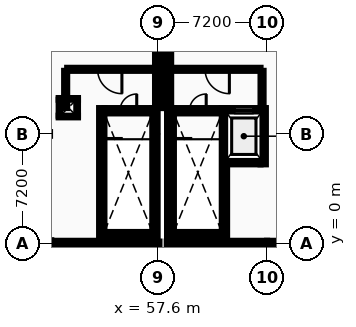
"""IFC4 building model, lengths in metres.
Left out: names, types, materials, properties, quantities, classifications, styles, units other than length and angle.
Written with IfcOpenShell. Run it as: python <this file> out.ifc"""

import sys

from ifc_helpers import new_model, si_unit, direction, frame, frame_2d, origin, origin_2d, place, context, subcontext, project, spatial, rectangle, i_section, extrude, element, fill, save


model = new_model("IFC4")
c1 = context("Model", 3, precision=1e-05, world=origin(), true_north=direction((0.0, 1.0)))
c2 = subcontext(c1, "Body", "Model", "MODEL_VIEW")
j1 = project(units=[si_unit("LENGTHUNIT", "METRE"), si_unit("PLANEANGLEUNIT", "RADIAN")], contexts=[c1])
p1 = place(None, origin())
s1 = spatial("IfcSite", under=j1, at=p1, CompositionType="ELEMENT")
p2 = place(p1, origin())
s2 = spatial("IfcBuilding", under=s1, at=p2, CompositionType="ELEMENT")
p3 = place(p2, frame((0.0, 0.0, 18.4)))
s3 = spatial("IfcBuildingStorey", under=s2, at=p3, CompositionType="ELEMENT", Elevation=18.4)
for number, where, z_axis, x_axis in (
    (1, (57.6, 0.0, 0.0), (0.0, 0.0, 1.0), (1.0, 0.0, 0.0)),
    (2, (58.32, 0.0, 0.0), (0.0, 0.0, 1.0), (1.0, 0.0, 0.0)),
    (3, (64.8, 0.0, 0.0), (0.0, 0.0, 1.0), (1.0, 0.0, 0.0)),
):
    element("IfcColumn", number, at=place(p3, frame(where, z_axis=z_axis, x_axis=x_axis)), inside=s3, PredefinedType="COLUMN", context=c2, shape_type="SweptSolid", body=[
        extrude(i_section(OverallWidth=0.24, OverallDepth=0.24, WebThickness=0.01, FlangeThickness=0.017, FilletRadius=0.021, at=origin_2d()), origin(), (0.0, 0.0, 1.0), 4.4),
    ])
p4 = place(p3, frame((50.29, 0.0, 0.0), z_axis=(0.0, 0.0, 1.0), x_axis=(1.0, 0.0, 0.0)))
e4 = element("IfcWall", 4, at=p4, inside=s3, PredefinedType="STANDARD", context=c2, shape_type="SweptSolid", body=[
    extrude(rectangle(XDim=7.14, YDim=0.34, at=frame_2d((3.57, 0.0))), origin(), (0.0, 0.0, 1.0), 4.035),
])
p5 = place(p4, frame((1.576, 0.0, 0.95)))
e5 = element("IfcOpeningElement", 5, at=p5, cuts=e4, PredefinedType="OPENING", context=c2, shape_type="SweptSolid", body=[
    extrude(rectangle(XDim=1.132, YDim=1.404, at=frame_2d((0.566, 0.702))), frame((0.0, 0.18, 0.0), z_axis=(0.0, -1.0, 0.0), x_axis=(1.0, 0.0, 0.0)), (0.0, 0.0, 1.0), 0.36),
])
p6 = place(p4, frame((4.432, 0.0, 0.95)))
e6 = element("IfcOpeningElement", 6, at=p6, cuts=e4, PredefinedType="OPENING", context=c2, shape_type="SweptSolid", body=[
    extrude(rectangle(XDim=1.132, YDim=1.404, at=frame_2d((0.566, 0.702))), frame((0.0, 0.18, 0.0), z_axis=(0.0, -1.0, 0.0), x_axis=(1.0, 0.0, 0.0)), (0.0, 0.0, 1.0), 0.36),
])
p7 = place(p3, frame((57.6, 8.9, 0.0), z_axis=(0.0, 0.0, 1.0), x_axis=(0.0, 1.0, 0.0)))
e7 = element("IfcWall", 7, at=p7, inside=s3, PredefinedType="STANDARD", context=c2, shape_type="SweptSolid", body=[
    extrude(rectangle(XDim=5.5, YDim=0.34, at=frame_2d((2.75, 0.0))), origin(), (0.0, 0.0, 1.0), 4.11),
])
p8 = place(p3, frame((58.49, 0.0, 0.0), z_axis=(0.0, 0.0, 1.0), x_axis=(1.0, 0.0, 0.0)))
e8 = element("IfcWall", 8, at=p8, inside=s3, PredefinedType="STANDARD", context=c2, shape_type="SweptSolid", body=[
    extrude(rectangle(XDim=6.31, YDim=0.34, at=frame_2d((3.155, 0.0))), origin(), (0.0, 0.0, 1.0), 4.035),
])
p9 = place(p3, frame((64.8, 0.0, 0.0), z_axis=(0.0, 0.0, 1.0), x_axis=(1.0, 0.0, 0.0)))
e9 = element("IfcWall", 9, at=p9, inside=s3, PredefinedType="STANDARD", context=c2, shape_type="SweptSolid", body=[
    extrude(rectangle(XDim=7.2, YDim=0.34, at=frame_2d((3.6, 0.0))), origin(), (0.0, 0.0, 1.0), 4.035),
])
p10 = place(p9, frame((1.645, 0.0, 0.95)))
e10 = element("IfcOpeningElement", 10, at=p10, cuts=e9, PredefinedType="OPENING", context=c2, shape_type="SweptSolid", body=[
    extrude(rectangle(XDim=1.03, YDim=1.368, at=frame_2d((0.515, 0.684))), frame((0.0, 0.18, 0.0), z_axis=(0.0, -1.0, 0.0), x_axis=(1.0, 0.0, 0.0)), (0.0, 0.0, 1.0), 0.36),
])
p11 = place(p9, frame((4.525, 0.0, 0.95)))
e11 = element("IfcOpeningElement", 11, at=p11, cuts=e9, PredefinedType="OPENING", context=c2, shape_type="SweptSolid", body=[
    extrude(rectangle(XDim=1.03, YDim=1.368, at=frame_2d((0.515, 0.684))), frame((0.0, 0.18, 0.0), z_axis=(0.0, -1.0, 0.0), x_axis=(1.0, 0.0, 0.0)), (0.0, 0.0, 1.0), 0.36),
])
p12 = place(p3, frame((58.32, 14.4, 0.0), z_axis=(0.0, 0.0, 1.0), x_axis=(0.0, -1.0, 0.0)))
e12 = element("IfcWall", 12, at=p12, inside=s3, PredefinedType="STANDARD", context=c2, shape_type="SweptSolid", body=[
    extrude(rectangle(XDim=5.5, YDim=0.34, at=frame_2d((2.75, 0.0))), origin(), (0.0, 0.0, 1.0), 4.11),
])
p13 = place(p3, frame((58.32, 0.2, 4.4), z_axis=(0.0, 0.0, 1.0), x_axis=(0.0, 1.0, 0.0)))
e13 = element("IfcWall", 13, at=p13, inside=s3, PredefinedType="PARAPET", context=c2, shape_type="SweptSolid", body=[
    extrude(rectangle(XDim=21.2, YDim=0.2, at=frame_2d((10.6, 0.0))), origin(), (0.0, 0.0, 1.0), 0.55),
])
p14 = place(p3, frame((54.1, 0.575, 0.0), z_axis=(0.0, 0.0, 1.0), x_axis=(1.0, 0.0, 0.0)))
e14 = element("IfcWall", 14, at=p14, inside=s3, PredefinedType="SHEAR", context=c2, shape_type="SweptSolid", body=[
    extrude(rectangle(XDim=3.15, YDim=0.35, at=frame_2d((1.575, 0.0))), origin(), (0.0, 0.0, 1.0), 4.18),
])
p15 = place(p3, frame((54.1, 8.725, 0.0), z_axis=(0.0, 0.0, 1.0), x_axis=(1.0, 0.0, 0.0)))
e15 = element("IfcWall", 15, at=p15, inside=s3, PredefinedType="SHEAR", context=c2, shape_type="SweptSolid", body=[
    extrude(rectangle(XDim=3.15, YDim=0.35, at=frame_2d((1.575, 0.0))), origin(), (0.0, 0.0, 1.0), 4.18),
])
p16 = place(p15, frame((1.025, 0.0, 0.0)))
e16 = element("IfcOpeningElement", 16, at=p16, cuts=e15, PredefinedType="OPENING", context=c2, shape_type="SweptSolid", body=[
    extrude(rectangle(XDim=1.1, YDim=2.15, at=frame_2d((0.55, 1.075))), frame((0.0, 0.185, 0.0), z_axis=(0.0, -1.0, 0.0), x_axis=(1.0, 0.0, 0.0)), (0.0, 0.0, 1.0), 0.37),
])
p17 = place(p3, frame((53.925, 0.4, 0.0), z_axis=(0.0, 0.0, 1.0), x_axis=(0.0, 1.0, 0.0)))
e17 = element("IfcWall", 17, at=p17, inside=s3, PredefinedType="SHEAR", context=c2, shape_type="SweptSolid", body=[
    extrude(rectangle(XDim=8.5, YDim=0.35, at=frame_2d((4.25, 0.0))), origin(), (0.0, 0.0, 1.0), 4.18),
])
p18 = place(p3, frame((57.425, 0.34, 0.0), z_axis=(0.0, 0.0, 1.0), x_axis=(0.0, 1.0, 0.0)))
e18 = element("IfcWall", 18, at=p18, inside=s3, PredefinedType="SHEAR", context=c2, shape_type="SweptSolid", body=[
    extrude(rectangle(XDim=8.56, YDim=0.35, at=frame_2d((4.28, 0.0))), origin(), (0.0, 0.0, 1.0), 4.18),
])
p19 = place(p3, frame((51.65, 11.45, 0.0), z_axis=(0.0, 0.0, 1.0), x_axis=(1.0, 0.0, 0.0)))
e19 = element("IfcWall", 19, at=p19, inside=s3, PredefinedType="PARTITIONING", context=c2, shape_type="SweptSolid", body=[
    extrude(rectangle(XDim=5.6, YDim=0.2, at=frame_2d((2.8, 0.0))), origin(), (0.0, 0.0, 1.0), 4.18),
])
p20 = place(p19, frame((2.0, 0.0, 0.0)))
e20 = element("IfcOpeningElement", 20, at=p20, cuts=e19, PredefinedType="OPENING", context=c2, shape_type="SweptSolid", body=[
    extrude(rectangle(XDim=1.6, YDim=2.2, at=frame_2d((0.8, 1.1))), frame((0.0, 0.11, 0.0), z_axis=(0.0, -1.0, 0.0), x_axis=(1.0, 0.0, 0.0)), (0.0, 0.0, 1.0), 0.22),
])
p21 = place(p3, frame((51.55, 8.9, 0.0), z_axis=(0.0, 0.0, 1.0), x_axis=(0.0, 1.0, 0.0)))
e21 = element("IfcWall", 21, at=p21, inside=s3, PredefinedType="PARTITIONING", context=c2, shape_type="SweptSolid", body=[
    extrude(rectangle(XDim=2.45, YDim=0.2, at=frame_2d((1.225, 0.0))), origin(), (0.0, 0.0, 1.0), 4.18),
])
p22 = place(p3, frame((58.67, 0.575, 0.0), z_axis=(0.0, 0.0, 1.0), x_axis=(1.0, 0.0, 0.0)))
e22 = element("IfcWall", 22, at=p22, inside=s3, PredefinedType="SHEAR", context=c2, shape_type="SweptSolid", body=[
    extrude(rectangle(XDim=3.15, YDim=0.35, at=frame_2d((1.575, 0.0))), origin(), (0.0, 0.0, 1.0), 4.18),
])
p23 = place(p3, frame((58.67, 8.725, 0.0), z_axis=(0.0, 0.0, 1.0), x_axis=(1.0, 0.0, 0.0)))
e23 = element("IfcWall", 23, at=p23, inside=s3, PredefinedType="SHEAR", context=c2, shape_type="SweptSolid", body=[
    extrude(rectangle(XDim=3.15, YDim=0.35, at=frame_2d((1.575, 0.0))), origin(), (0.0, 0.0, 1.0), 4.18),
])
p24 = place(p23, frame((1.025, 0.0, 0.0)))
e24 = element("IfcOpeningElement", 24, at=p24, cuts=e23, PredefinedType="OPENING", context=c2, shape_type="SweptSolid", body=[
    extrude(rectangle(XDim=1.1, YDim=2.15, at=frame_2d((0.55, 1.075))), frame((0.0, 0.185, 0.0), z_axis=(0.0, -1.0, 0.0), x_axis=(1.0, 0.0, 0.0)), (0.0, 0.0, 1.0), 0.37),
])
p25 = place(p3, frame((58.495, 0.34, 0.0), z_axis=(0.0, 0.0, 1.0), x_axis=(0.0, 1.0, 0.0)))
e25 = element("IfcWall", 25, at=p25, inside=s3, PredefinedType="SHEAR", context=c2, shape_type="SweptSolid", body=[
    extrude(rectangle(XDim=8.56, YDim=0.35, at=frame_2d((4.28, 0.0))), origin(), (0.0, 0.0, 1.0), 4.18),
])
p26 = place(p3, frame((61.995, 0.4, 0.0), z_axis=(0.0, 0.0, 1.0), x_axis=(0.0, 1.0, 0.0)))
e26 = element("IfcWall", 26, at=p26, inside=s3, PredefinedType="SHEAR", context=c2, shape_type="SweptSolid", body=[
    extrude(rectangle(XDim=8.5, YDim=0.35, at=frame_2d((4.25, 0.0))), origin(), (0.0, 0.0, 1.0), 4.18),
])
p27 = place(p3, frame((62.17, 5.375, 0.0), z_axis=(0.0, 0.0, 1.0), x_axis=(1.0, 0.0, 0.0)))
e27 = element("IfcWall", 27, at=p27, inside=s3, PredefinedType="SHEAR", context=c2, shape_type="SweptSolid", body=[
    extrude(rectangle(XDim=2.2, YDim=0.35, at=frame_2d((1.1, 0.0))), origin(), (0.0, 0.0, 1.0), 4.18),
])
p28 = place(p3, frame((62.17, 8.725, 0.0), z_axis=(0.0, 0.0, 1.0), x_axis=(1.0, 0.0, 0.0)))
e28 = element("IfcWall", 28, at=p28, inside=s3, PredefinedType="SHEAR", context=c2, shape_type="SweptSolid", body=[
    extrude(rectangle(XDim=2.2, YDim=0.35, at=frame_2d((1.1, 0.0))), origin(), (0.0, 0.0, 1.0), 4.18),
])
p29 = place(p28, frame((0.5, 0.0, 0.0)))
e29 = element("IfcOpeningElement", 29, at=p29, cuts=e28, PredefinedType="OPENING", context=c2, shape_type="SweptSolid", body=[
    extrude(rectangle(XDim=1.2, YDim=2.2, at=frame_2d((0.6, 1.1))), frame((0.0, 0.185, 0.0), z_axis=(0.0, -1.0, 0.0), x_axis=(1.0, 0.0, 0.0)), (0.0, 0.0, 1.0), 0.37),
])
p30 = place(p3, frame((64.545, 5.2, 0.0), z_axis=(0.0, 0.0, 1.0), x_axis=(0.0, 1.0, 0.0)))
e30 = element("IfcWall", 30, at=p30, inside=s3, PredefinedType="SHEAR", context=c2, shape_type="SweptSolid", body=[
    extrude(rectangle(XDim=3.7, YDim=0.35, at=frame_2d((1.85, 0.0))), origin(), (0.0, 0.0, 1.0), 4.18),
])
p31 = place(p3, frame((58.67, 11.45, 0.0), z_axis=(0.0, 0.0, 1.0), x_axis=(1.0, 0.0, 0.0)))
e31 = element("IfcWall", 31, at=p31, inside=s3, PredefinedType="PARTITIONING", context=c2, shape_type="SweptSolid", body=[
    extrude(rectangle(XDim=5.7, YDim=0.2, at=frame_2d((2.85, 0.0))), origin(), (0.0, 0.0, 1.0), 4.18),
])
p32 = place(p31, frame((2.05, 0.0, 0.0)))
e32 = element("IfcOpeningElement", 32, at=p32, cuts=e31, PredefinedType="OPENING", context=c2, shape_type="SweptSolid", body=[
    extrude(rectangle(XDim=1.6, YDim=2.2, at=frame_2d((0.8, 1.1))), frame((0.0, 0.11, 0.0), z_axis=(0.0, -1.0, 0.0), x_axis=(1.0, 0.0, 0.0)), (0.0, 0.0, 1.0), 0.22),
])
p33 = place(p3, frame((64.47, 8.9, 0.0), z_axis=(0.0, 0.0, 1.0), x_axis=(0.0, 1.0, 0.0)))
e33 = element("IfcWall", 33, at=p33, inside=s3, PredefinedType="PARTITIONING", context=c2, shape_type="SweptSolid", body=[
    extrude(rectangle(XDim=2.45, YDim=0.2, at=frame_2d((1.225, 0.0))), origin(), (0.0, 0.0, 1.0), 4.18),
])
for number, where, z_axis, x_axis in (
    (34, (51.09, 8.345, 0.0), (0.0, 0.0, 1.0), (1.0, 0.0, 0.0)),
    (35, (51.09, 9.505, 0.0), (0.0, 0.0, 1.0), (1.0, 0.0, 0.0)),
):
    element("IfcWall", number, at=place(p3, frame(where, z_axis=z_axis, x_axis=x_axis)), inside=s3, PredefinedType="PARTITIONING", context=c2, shape_type="SweptSolid", body=[
        extrude(rectangle(XDim=1.27, YDim=0.11, at=frame_2d((0.635, 0.0))), origin(), (0.0, 0.0, 1.0), 4.18),
    ])
for number, where, z_axis, x_axis in (
    (36, (51.145, 8.4, 0.0), (0.0, 0.0, 1.0), (0.0, 1.0, 0.0)),
    (37, (52.305, 8.4, 0.0), (0.0, 0.0, 1.0), (0.0, 1.0, 0.0)),
):
    element("IfcWall", number, at=place(p3, frame(where, z_axis=z_axis, x_axis=x_axis)), inside=s3, PredefinedType="PARTITIONING", context=c2, shape_type="SweptSolid", body=[
        extrude(rectangle(XDim=1.05, YDim=0.11, at=frame_2d((0.525, 0.0))), origin(), (0.0, 0.0, 1.0), 4.18),
    ])
p34 = place(p5, origin())
e38 = element("IfcWindow", 38, at=p34, inside=s3, PartitioningType="SINGLE_PANEL", PredefinedType="WINDOW", context=c2, shape_type="SweptSolid", body=[
    extrude(rectangle(XDim=1.132, YDim=1.404, at=frame_2d((0.566, 0.702))), frame((0.0, 0.03, 0.0), z_axis=(0.0, -1.0, 0.0), x_axis=(1.0, 0.0, 0.0)), (0.0, 0.0, 1.0), 0.06),
])
fill(e5, e38)
p35 = place(p6, origin())
e39 = element("IfcWindow", 39, at=p35, inside=s3, PartitioningType="SINGLE_PANEL", PredefinedType="WINDOW", context=c2, shape_type="SweptSolid", body=[
    extrude(rectangle(XDim=1.132, YDim=1.404, at=frame_2d((0.566, 0.702))), frame((0.0, 0.03, 0.0), z_axis=(0.0, -1.0, 0.0), x_axis=(1.0, 0.0, 0.0)), (0.0, 0.0, 1.0), 0.06),
])
fill(e6, e39)
p36 = place(p16, frame((1.1, 0.0, 0.0), z_axis=(0.0, 0.0, 1.0), x_axis=(-1.0, 0.0, 0.0)))
e40 = element("IfcDoor", 40, at=p36, inside=s3, OperationType="SINGLE_SWING_RIGHT", PredefinedType="DOOR", context=c2, shape_type="SweptSolid", body=[
    extrude(rectangle(XDim=1.1, YDim=2.15, at=frame_2d((0.55, 1.075))), frame((0.0, 0.025, 0.0), z_axis=(0.0, -1.0, 0.0), x_axis=(1.0, 0.0, 0.0)), (0.0, 0.0, 1.0), 0.05),
])
fill(e16, e40)
p37 = place(p20, origin())
e41 = element("IfcDoor", 41, at=p37, inside=s3, OperationType="DOUBLE_DOOR_SINGLE_SWING", PredefinedType="DOOR", context=c2, shape_type="SweptSolid", body=[
    extrude(rectangle(XDim=1.6, YDim=2.2, at=frame_2d((0.8, 1.1))), frame((0.0, 0.025, 0.0), z_axis=(0.0, -1.0, 0.0), x_axis=(1.0, 0.0, 0.0)), (0.0, 0.0, 1.0), 0.05),
])
fill(e20, e41)
p38 = place(p24, frame((1.1, 0.0, 0.0), z_axis=(0.0, 0.0, 1.0), x_axis=(-1.0, 0.0, 0.0)))
e42 = element("IfcDoor", 42, at=p38, inside=s3, OperationType="SINGLE_SWING_RIGHT", PredefinedType="DOOR", context=c2, shape_type="SweptSolid", body=[
    extrude(rectangle(XDim=1.1, YDim=2.15, at=frame_2d((0.55, 1.075))), frame((0.0, 0.025, 0.0), z_axis=(0.0, -1.0, 0.0), x_axis=(1.0, 0.0, 0.0)), (0.0, 0.0, 1.0), 0.05),
])
fill(e24, e42)
p39 = place(p29, origin())
e43 = element("IfcDoor", 43, at=p39, inside=s3, OperationType="SLIDING_TO_RIGHT", PredefinedType="DOOR", context=c2, shape_type="SweptSolid", body=[
    extrude(rectangle(XDim=1.2, YDim=2.2, at=frame_2d((0.6, 1.1))), frame((0.0, 0.025, 0.0), z_axis=(0.0, -1.0, 0.0), x_axis=(1.0, 0.0, 0.0)), (0.0, 0.0, 1.0), 0.05),
])
fill(e29, e43)
p40 = place(p32, origin())
e44 = element("IfcDoor", 44, at=p40, inside=s3, OperationType="DOUBLE_DOOR_SINGLE_SWING", PredefinedType="DOOR", context=c2, shape_type="SweptSolid", body=[
    extrude(rectangle(XDim=1.6, YDim=2.2, at=frame_2d((0.8, 1.1))), frame((0.0, 0.025, 0.0), z_axis=(0.0, -1.0, 0.0), x_axis=(1.0, 0.0, 0.0)), (0.0, 0.0, 1.0), 0.05),
])
fill(e32, e44)
save(model, sys.argv[1])
